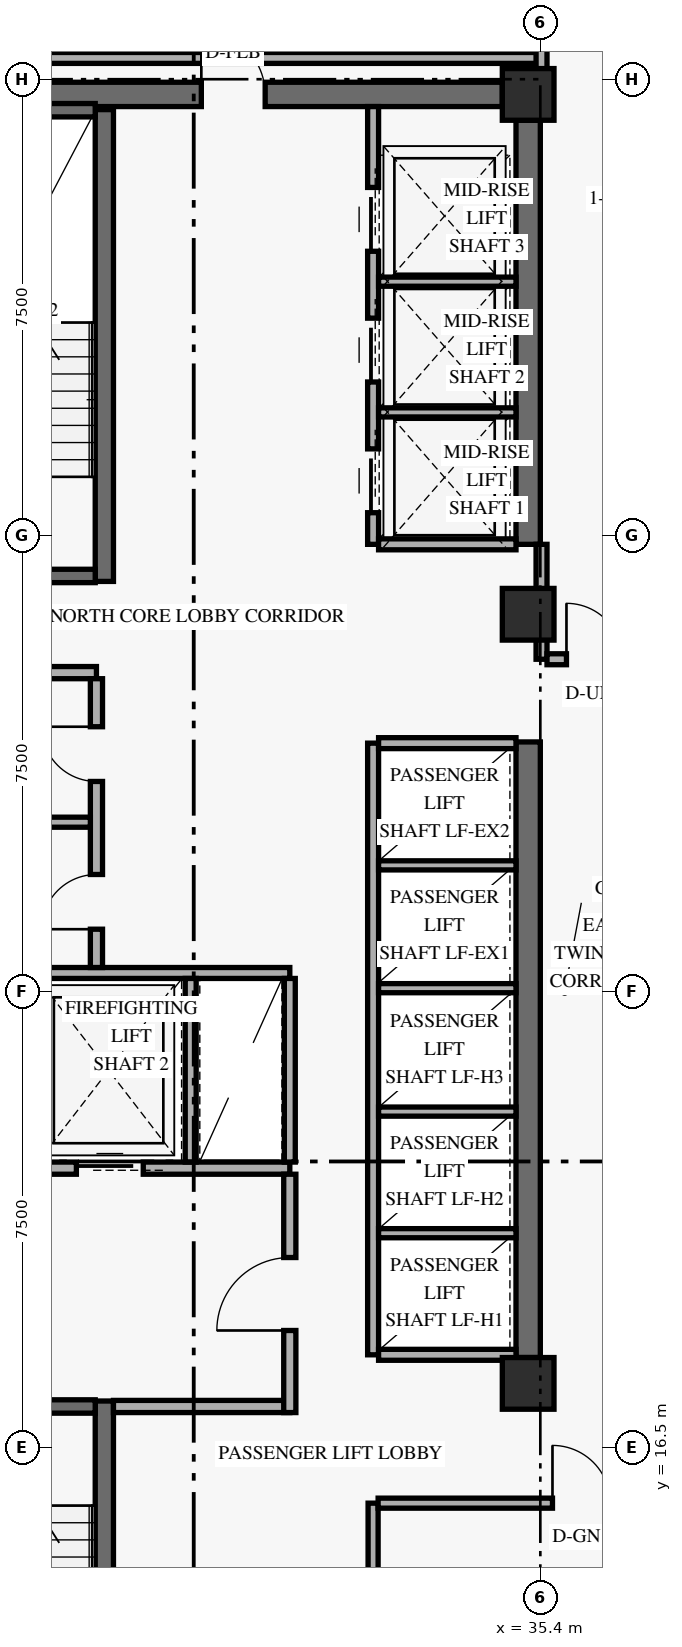
"""IFC4 building model, lengths in metres.
Left out: names, types, materials, properties, quantities, classifications, styles, units other than length and angle.
Written with IfcOpenShell. Run it as: python <this file> out.ifc"""

import sys

from ifc_helpers import new_model, si_unit, direction, frame, frame_2d, origin, origin_2d, place, context, subcontext, project, spatial, rectangle, extrude, element, fill, save


model = new_model("IFC4")
c1 = context("Model", 3, precision=1e-05, world=origin(), true_north=direction((0.0, 1.0)))
c2 = subcontext(c1, "Body", "Model", "MODEL_VIEW")
j1 = project(units=[si_unit("LENGTHUNIT", "METRE"), si_unit("PLANEANGLEUNIT", "RADIAN")], contexts=[c1])
p1 = place(None, origin())
s1 = spatial("IfcSite", under=j1, at=p1, CompositionType="ELEMENT")
p2 = place(p1, origin())
s2 = spatial("IfcBuilding", under=s1, at=p2, CompositionType="ELEMENT")
p3 = place(p2, frame((0.0, 0.0, 109.8)))
s3 = spatial("IfcBuildingStorey", under=s2, at=p3, CompositionType="ELEMENT", Elevation=109.8)
p4 = place(p3, frame((35.2, 17.975, 0.0), z_axis=(0.0, 0.0, 1.0), x_axis=(0.0, 1.0, 0.0)))
e1 = element("IfcWall", 1, at=p4, inside=s3, PredefinedType="SHEAR", context=c2, shape_type="SweptSolid", body=[
    extrude(rectangle(XDim=10.125, YDim=0.4, at=frame_2d((5.062, 0.0))), origin(), (0.0, 0.0, 1.0), 2.749),
])
p5 = place(p3, frame((35.2, 31.35, 0.0), z_axis=(0.0, 0.0, 1.0), x_axis=(0.0, 1.0, 0.0)))
e2 = element("IfcWall", 2, at=p5, inside=s3, PredefinedType="SHEAR", context=c2, shape_type="SweptSolid", body=[
    extrude(rectangle(XDim=6.975, YDim=0.4, at=frame_2d((3.487, 0.0))), origin(), (0.0, 0.0, 1.0), 2.749),
])
p6 = place(p3, frame((24.625, 38.75, 0.0), z_axis=(0.0, 0.0, 1.0), x_axis=(1.0, 0.0, 0.0)))
e3 = element("IfcWall", 3, at=p6, inside=s3, PredefinedType="SHEAR", context=c2, shape_type="SweptSolid", body=[
    extrude(rectangle(XDim=10.15, YDim=0.4, at=frame_2d((5.075, 0.0))), origin(), (0.0, 0.0, 1.0), 3.36),
])
p7 = place(p6, frame((5.2, 0.0, 0.0)))
e4 = element("IfcOpeningElement", 4, at=p7, cuts=e3, PredefinedType="OPENING", context=c2, shape_type="SweptSolid", body=[
    extrude(rectangle(XDim=1.05, YDim=2.15, at=frame_2d((0.525, 1.075))), frame((0.0, 0.21, 0.0), z_axis=(0.0, -1.0, 0.0), x_axis=(1.0, 0.0, 0.0)), (0.0, 0.0, 1.0), 0.42),
])
p8 = place(p3, frame((28.23, 9.5, 0.0), z_axis=(0.0, 0.0, 1.0), x_axis=(0.0, 1.0, 0.0)))
e5 = element("IfcWall", 5, at=p8, inside=s3, PredefinedType="SHEAR", context=c2, shape_type="SweptSolid", body=[
    extrude(rectangle(XDim=7.76, YDim=0.3, at=frame_2d((3.88, 0.0))), origin(), (0.0, 0.0, 1.0), 3.36),
])
p9 = place(p3, frame((24.92, 17.17, 0.0), z_axis=(0.0, 0.0, 1.0), x_axis=(1.0, 0.0, 0.0)))
e6 = element("IfcWall", 6, at=p9, inside=s3, PredefinedType="SHEAR", context=c2, shape_type="SweptSolid", body=[
    extrude(rectangle(XDim=3.16, YDim=0.22, at=frame_2d((1.58, 0.0))), origin(), (0.0, 0.0, 1.0), 3.36),
])
p10 = place(p9, frame((0.78, 0.0, 0.0)))
e7 = element("IfcOpeningElement", 7, at=p10, cuts=e6, PredefinedType="OPENING", context=c2, shape_type="SweptSolid", body=[
    extrude(rectangle(XDim=1.05, YDim=2.15, at=frame_2d((0.525, 1.075))), frame((0.0, 0.12, 0.0), z_axis=(0.0, -1.0, 0.0), x_axis=(1.0, 0.0, 0.0)), (0.0, 0.0, 1.0), 0.24),
])
p11 = place(p3, frame((28.23, 30.74, 0.0), z_axis=(0.0, 0.0, 1.0), x_axis=(0.0, 1.0, 0.0)))
e8 = element("IfcWall", 8, at=p11, inside=s3, PredefinedType="SHEAR", context=c2, shape_type="SweptSolid", body=[
    extrude(rectangle(XDim=7.76, YDim=0.3, at=frame_2d((3.88, 0.0))), origin(), (0.0, 0.0, 1.0), 3.36),
])
p12 = place(p3, frame((24.92, 30.83, 0.0), z_axis=(0.0, 0.0, 1.0), x_axis=(1.0, 0.0, 0.0)))
e9 = element("IfcWall", 9, at=p12, inside=s3, PredefinedType="SHEAR", context=c2, shape_type="SweptSolid", body=[
    extrude(rectangle(XDim=3.16, YDim=0.22, at=frame_2d((1.58, 0.0))), origin(), (0.0, 0.0, 1.0), 3.36),
])
p13 = place(p12, frame((0.78, 0.0, 0.0)))
e10 = element("IfcOpeningElement", 10, at=p13, cuts=e9, PredefinedType="OPENING", context=c2, shape_type="SweptSolid", body=[
    extrude(rectangle(XDim=1.05, YDim=2.15, at=frame_2d((0.525, 1.075))), frame((0.0, 0.12, 0.0), z_axis=(0.0, -1.0, 0.0), x_axis=(1.0, 0.0, 0.0)), (0.0, 0.0, 1.0), 0.24),
])
p14 = place(p3, frame((24.92, 38.49, 0.0), z_axis=(0.0, 0.0, 1.0), x_axis=(1.0, 0.0, 0.0)))
e11 = element("IfcWall", 11, at=p14, inside=s3, PredefinedType="SHEAR", context=c2, shape_type="SweptSolid", body=[
    extrude(rectangle(XDim=3.16, YDim=0.22, at=frame_2d((1.58, 0.0))), origin(), (0.0, 0.0, 1.0), 3.36),
])
for number, where, z_axis, x_axis in (
    (12, (35.2, 17.55, 0.0), (0.0, 0.0, 1.0), (1.0, 0.0, 0.0)),
    (13, (35.2, 30.2, 0.0), (0.0, 0.0, 1.0), (1.0, 0.0, 0.0)),
    (14, (35.2, 38.75, 0.0), (0.0, 0.0, 1.0), (1.0, 0.0, 0.0)),
):
    element("IfcColumn", number, at=place(p3, frame(where, z_axis=z_axis, x_axis=x_axis)), inside=s3, PredefinedType="COLUMN", context=c2, shape_type="SweptSolid", body=[
        extrude(rectangle(XDim=0.85, YDim=0.85, at=origin_2d()), origin(), (0.0, 0.0, 1.0), 3.6),
    ])
p15 = place(p3, frame((24.45, 21.09, 0.0), z_axis=(0.0, 0.0, 1.0), x_axis=(1.0, 0.0, 0.0)))
e15 = element("IfcWall", 15, at=p15, inside=s3, PredefinedType="STANDARD", context=c2, shape_type="SweptSolid", body=[
    extrude(rectangle(XDim=6.83, YDim=0.2, at=frame_2d((3.415, 0.0))), origin(), (0.0, 0.0, 1.0), 3.36),
])
p16 = place(p15, frame((0.72, 0.0, 0.0)))
e16 = element("IfcOpeningElement", 16, at=p16, cuts=e15, PredefinedType="OPENING", context=c2, shape_type="SweptSolid", body=[
    extrude(rectangle(XDim=1.1, YDim=2.2, at=frame_2d((0.55, 1.1))), frame((0.0, 0.11, 0.0), z_axis=(0.0, -1.0, 0.0), x_axis=(1.0, 0.0, 0.0)), (0.0, 0.0, 1.0), 0.22),
])
p17 = place(p15, frame((3.32, 0.0, 0.0)))
e17 = element("IfcOpeningElement", 17, at=p17, cuts=e15, PredefinedType="OPENING", context=c2, shape_type="SweptSolid", body=[
    extrude(rectangle(XDim=1.1, YDim=2.2, at=frame_2d((0.55, 1.1))), frame((0.0, 0.11, 0.0), z_axis=(0.0, -1.0, 0.0), x_axis=(1.0, 0.0, 0.0)), (0.0, 0.0, 1.0), 0.22),
])
p18 = place(p3, frame((28.38, 17.17, 0.0), z_axis=(0.0, 0.0, 1.0), x_axis=(1.0, 0.0, 0.0)))
e18 = element("IfcWall", 18, at=p18, inside=s3, PredefinedType="STANDARD", context=c2, shape_type="SweptSolid", body=[
    extrude(rectangle(XDim=2.9, YDim=0.2, at=frame_2d((1.45, 0.0))), origin(), (0.0, 0.0, 1.0), 3.36),
])
p19 = place(p3, frame((31.28, 17.07, 0.0), z_axis=(0.0, 0.0, 1.0), x_axis=(0.0, 1.0, 0.0)))
e19 = element("IfcWall", 19, at=p19, inside=s3, PredefinedType="STANDARD", context=c2, shape_type="SweptSolid", body=[
    extrude(rectangle(XDim=3.92, YDim=0.2, at=frame_2d((1.96, 0.0))), origin(), (0.0, 0.0, 1.0), 2.731),
])
p20 = place(p19, frame((1.35, 0.0, 0.0)))
e20 = element("IfcOpeningElement", 20, at=p20, cuts=e19, PredefinedType="OPENING", context=c2, shape_type="SweptSolid", body=[
    extrude(rectangle(XDim=1.2, YDim=2.15, at=frame_2d((0.6, 1.075))), frame((0.0, 0.11, 0.0), z_axis=(0.0, -1.0, 0.0), x_axis=(1.0, 0.0, 0.0)), (0.0, 0.0, 1.0), 0.22),
])
p21 = place(p3, frame((24.45, 24.3, 0.0), z_axis=(0.0, 0.0, 1.0), x_axis=(1.0, 0.0, 0.0)))
e21 = element("IfcWall", 21, at=p21, inside=s3, PredefinedType="STANDARD", context=c2, shape_type="SweptSolid", body=[
    extrude(rectangle(XDim=6.83, YDim=0.18, at=frame_2d((3.415, 0.0))), origin(), (0.0, 0.0, 1.0), 3.36),
])
for number, where, z_axis, x_axis in (
    (22, (29.65, 21.19, 0.0), (0.0, 0.0, 1.0), (0.0, 1.0, 0.0)),
    (23, (31.28, 21.19, 0.0), (0.0, 0.0, 1.0), (0.0, 1.0, 0.0)),
):
    element("IfcWall", number, at=place(p3, frame(where, z_axis=z_axis, x_axis=x_axis)), inside=s3, PredefinedType="STANDARD", context=c2, shape_type="SweptSolid", body=[
        extrude(rectangle(XDim=3.02, YDim=0.18, at=frame_2d((1.51, 0.0))), origin(), (0.0, 0.0, 1.0), 3.36),
    ])
p22 = place(p3, frame((24.45, 29.24, 0.0), z_axis=(0.0, 0.0, 1.0), x_axis=(1.0, 0.0, 0.0)))
e24 = element("IfcWall", 24, at=p22, inside=s3, PredefinedType="STANDARD", context=c2, shape_type="SweptSolid", body=[
    extrude(rectangle(XDim=3.65, YDim=0.2, at=frame_2d((1.825, 0.0))), origin(), (0.0, 0.0, 1.0), 3.36),
])
p23 = place(p3, frame((28.1, 24.39, 0.0), z_axis=(0.0, 0.0, 1.0), x_axis=(0.0, 1.0, 0.0)))
e25 = element("IfcWall", 25, at=p23, inside=s3, PredefinedType="STANDARD", context=c2, shape_type="SweptSolid", body=[
    extrude(rectangle(XDim=4.75, YDim=0.2, at=frame_2d((2.375, 0.0))), origin(), (0.0, 0.0, 1.0), 3.36),
])
p24 = place(p23, frame((0.63, 0.0, 0.0)))
e26 = element("IfcOpeningElement", 26, at=p24, cuts=e25, PredefinedType="OPENING", context=c2, shape_type="SweptSolid", body=[
    extrude(rectangle(XDim=0.9, YDim=2.1, at=frame_2d((0.45, 1.05))), frame((0.0, 0.11, 0.0), z_axis=(0.0, -1.0, 0.0), x_axis=(1.0, 0.0, 0.0)), (0.0, 0.0, 1.0), 0.22),
])
p25 = place(p23, frame((3.06, 0.0, 0.0)))
e27 = element("IfcOpeningElement", 27, at=p25, cuts=e25, PredefinedType="OPENING", context=c2, shape_type="SweptSolid", body=[
    extrude(rectangle(XDim=0.9, YDim=2.1, at=frame_2d((0.45, 1.05))), frame((0.0, 0.11, 0.0), z_axis=(0.0, -1.0, 0.0), x_axis=(1.0, 0.0, 0.0)), (0.0, 0.0, 1.0), 0.22),
])
p26 = place(p3, frame((24.45, 26.78, 0.0), z_axis=(0.0, 0.0, 1.0), x_axis=(1.0, 0.0, 0.0)))
e28 = element("IfcWall", 28, at=p26, inside=s3, PredefinedType="PARTITIONING", context=c2, shape_type="SweptSolid", body=[
    extrude(rectangle(XDim=3.55, YDim=0.165, at=frame_2d((1.775, 0.0))), origin(), (0.0, 0.0, 1.0), 3.36),
])
p27 = place(p3, frame((32.65, 18.02, 0.0), z_axis=(0.0, 0.0, 1.0), x_axis=(0.0, 1.0, 0.0)))
e29 = element("IfcWall", 29, at=p27, inside=s3, PredefinedType="STANDARD", context=c2, shape_type="SweptSolid", body=[
    extrude(rectangle(XDim=10.06, YDim=0.18, at=frame_2d((5.03, 0.0))), origin(), (0.0, 0.0, 1.0), 3.36),
])
for number, where, z_axis, x_axis in (
    (30, (32.74, 18.02, 0.0), (0.0, 0.0, 1.0), (1.0, 0.0, 0.0)),
    (31, (32.74, 28.08, 0.0), (0.0, 0.0, 1.0), (1.0, 0.0, 0.0)),
):
    element("IfcWall", number, at=place(p3, frame(where, z_axis=z_axis, x_axis=x_axis)), inside=s3, PredefinedType="STANDARD", context=c2, shape_type="SweptSolid", body=[
        extrude(rectangle(XDim=2.26, YDim=0.18, at=frame_2d((1.13, 0.0))), origin(), (0.0, 0.0, 1.0), 3.36),
    ])
for number, where, z_axis, x_axis in (
    (32, (32.74, 20.02, 0.0), (0.0, 0.0, 1.0), (1.0, 0.0, 0.0)),
    (33, (32.74, 22.02, 0.0), (0.0, 0.0, 1.0), (1.0, 0.0, 0.0)),
    (34, (32.74, 24.05, 0.0), (0.0, 0.0, 1.0), (1.0, 0.0, 0.0)),
    (35, (32.74, 26.07, 0.0), (0.0, 0.0, 1.0), (1.0, 0.0, 0.0)),
):
    element("IfcWall", number, at=place(p3, frame(where, z_axis=z_axis, x_axis=x_axis)), inside=s3, PredefinedType="STANDARD", context=c2, shape_type="SweptSolid", body=[
        extrude(rectangle(XDim=2.26, YDim=0.15, at=frame_2d((1.13, 0.0))), origin(), (0.0, 0.0, 1.0), 3.36),
    ])
p28 = place(p3, frame((32.65, 31.35, 0.0), z_axis=(0.0, 0.0, 1.0), x_axis=(0.0, 1.0, 0.0)))
e36 = element("IfcWall", 36, at=p28, inside=s3, PredefinedType="STANDARD", context=c2, shape_type="SweptSolid", body=[
    extrude(rectangle(XDim=7.2, YDim=0.18, at=frame_2d((3.6, 0.0))), origin(), (0.0, 0.0, 1.0), 3.36),
])
p29 = place(p28, frame((0.52, 0.0, 0.0)))
e37 = element("IfcOpeningElement", 37, at=p29, cuts=e36, PredefinedType="OPENING", context=c2, shape_type="SweptSolid", body=[
    extrude(rectangle(XDim=1.05, YDim=2.2, at=frame_2d((0.525, 1.1))), frame((0.0, 0.1, 0.0), z_axis=(0.0, -1.0, 0.0), x_axis=(1.0, 0.0, 0.0)), (0.0, 0.0, 1.0), 0.2),
])
p30 = place(p28, frame((2.67, 0.0, 0.0)))
e38 = element("IfcOpeningElement", 38, at=p30, cuts=e36, PredefinedType="OPENING", context=c2, shape_type="SweptSolid", body=[
    extrude(rectangle(XDim=1.05, YDim=2.2, at=frame_2d((0.525, 1.1))), frame((0.0, 0.1, 0.0), z_axis=(0.0, -1.0, 0.0), x_axis=(1.0, 0.0, 0.0)), (0.0, 0.0, 1.0), 0.2),
])
p31 = place(p28, frame((4.82, 0.0, 0.0)))
e39 = element("IfcOpeningElement", 39, at=p31, cuts=e36, PredefinedType="OPENING", context=c2, shape_type="SweptSolid", body=[
    extrude(rectangle(XDim=1.05, YDim=2.2, at=frame_2d((0.525, 1.1))), frame((0.0, 0.1, 0.0), z_axis=(0.0, -1.0, 0.0), x_axis=(1.0, 0.0, 0.0)), (0.0, 0.0, 1.0), 0.2),
])
p32 = place(p3, frame((32.74, 31.35, 0.0), z_axis=(0.0, 0.0, 1.0), x_axis=(1.0, 0.0, 0.0)))
e40 = element("IfcWall", 40, at=p32, inside=s3, PredefinedType="STANDARD", context=c2, shape_type="SweptSolid", body=[
    extrude(rectangle(XDim=2.26, YDim=0.18, at=frame_2d((1.13, 0.0))), origin(), (0.0, 0.0, 1.0), 3.36),
])
for number, where, z_axis, x_axis in (
    (41, (32.74, 33.52, 0.0), (0.0, 0.0, 1.0), (1.0, 0.0, 0.0)),
    (42, (32.74, 35.67, 0.0), (0.0, 0.0, 1.0), (1.0, 0.0, 0.0)),
):
    element("IfcWall", number, at=place(p3, frame(where, z_axis=z_axis, x_axis=x_axis)), inside=s3, PredefinedType="STANDARD", context=c2, shape_type="SweptSolid", body=[
        extrude(rectangle(XDim=2.26, YDim=0.15, at=frame_2d((1.13, 0.0))), origin(), (0.0, 0.0, 1.0), 3.36),
    ])
p33 = place(p3, frame((32.65, 9.5, 0.0), z_axis=(0.0, 0.0, 1.0), x_axis=(0.0, 1.0, 0.0)))
e43 = element("IfcWall", 43, at=p33, inside=s3, PredefinedType="PARTITIONING", context=c2, shape_type="SweptSolid", body=[
    extrude(rectangle(XDim=6.08, YDim=0.165, at=frame_2d((3.04, 0.0))), origin(), (0.0, 0.0, 1.0), 3.36),
])
p34 = place(p3, frame((32.732, 15.58, 0.0), z_axis=(0.0, 0.0, 1.0), x_axis=(1.0, 0.0, 0.0)))
e44 = element("IfcWall", 44, at=p34, inside=s3, PredefinedType="PARTITIONING", context=c2, shape_type="SweptSolid", body=[
    extrude(rectangle(XDim=5.218, YDim=0.165, at=frame_2d((2.609, 0.0))), origin(), (0.0, 0.0, 1.0), 2.731),
])
p35 = place(p34, frame((2.867, 0.0, 0.0)))
e45 = element("IfcOpeningElement", 45, at=p35, cuts=e44, PredefinedType="OPENING", context=c2, shape_type="SweptSolid", body=[
    extrude(rectangle(XDim=0.95, YDim=2.15, at=frame_2d((0.475, 1.075))), frame((0.0, 0.093, 0.0), z_axis=(0.0, -1.0, 0.0), x_axis=(1.0, 0.0, 0.0)), (0.0, 0.0, 1.0), 0.185),
])
p36 = place(p3, frame((35.42, 29.46, 0.0), z_axis=(0.0, 0.0, 1.0), x_axis=(0.0, 1.0, 0.0)))
e46 = element("IfcWall", 46, at=p36, inside=s3, PredefinedType="STANDARD", context=c2, shape_type="SweptSolid", body=[
    extrude(rectangle(XDim=1.89, YDim=0.18, at=frame_2d((0.945, 0.0))), origin(), (0.0, 0.0, 1.0), 2.731),
])
p37 = place(p3, frame((35.51, 29.46, 0.0), z_axis=(0.0, 0.0, 1.0), x_axis=(1.0, 0.0, 0.0)))
e47 = element("IfcWall", 47, at=p37, inside=s3, PredefinedType="STANDARD", context=c2, shape_type="SweptSolid", body=[
    extrude(rectangle(XDim=10.09, YDim=0.18, at=frame_2d((5.045, 0.0))), origin(), (0.0, 0.0, 1.0), 2.731),
])
p38 = place(p37, frame((0.32, 0.0, 0.0)))
e48 = element("IfcOpeningElement", 48, at=p38, cuts=e47, PredefinedType="OPENING", context=c2, shape_type="SweptSolid", body=[
    extrude(rectangle(XDim=0.92, YDim=2.15, at=frame_2d((0.46, 1.075))), frame((0.0, 0.1, 0.0), z_axis=(0.0, -1.0, 0.0), x_axis=(1.0, 0.0, 0.0)), (0.0, 0.0, 1.0), 0.2),
])
p39 = place(p3, frame((23.85, 39.35, 0.0), z_axis=(0.0, 0.0, 1.0), x_axis=(1.0, 0.0, 0.0)))
e49 = element("IfcWall", 49, at=p39, inside=s3, PredefinedType="STANDARD", context=c2, shape_type="SweptSolid", body=[
    extrude(rectangle(XDim=11.57, YDim=0.18, at=frame_2d((5.785, 0.0))), origin(), (0.0, 0.0, 1.0), 2.731),
])
p40 = place(p3, frame((35.42, 38.75, 0.0), z_axis=(0.0, 0.0, 1.0), x_axis=(0.0, 1.0, 0.0)))
e50 = element("IfcWall", 50, at=p40, inside=s3, PredefinedType="PARTITIONING", context=c2, shape_type="SweptSolid", body=[
    extrude(rectangle(XDim=6.27, YDim=0.18, at=frame_2d((3.135, 0.0))), origin(), (0.0, 0.0, 1.0), 2.731),
])
p41 = place(p17, origin())
e51 = element("IfcDoor", 51, at=p41, inside=s3, OperationType="SLIDING_TO_LEFT", PredefinedType="DOOR", context=c2, shape_type="SweptSolid", body=[
    extrude(rectangle(XDim=1.1, YDim=2.2, at=frame_2d((0.55, 1.1))), frame((0.0, 0.025, 0.0), z_axis=(0.0, -1.0, 0.0), x_axis=(1.0, 0.0, 0.0)), (0.0, 0.0, 1.0), 0.05),
])
fill(e17, e51)
p42 = place(p20, origin())
e52 = element("IfcDoor", 52, at=p42, inside=s3, OperationType="SINGLE_SWING_LEFT", PredefinedType="DOOR", context=c2, shape_type="SweptSolid", body=[
    extrude(rectangle(XDim=1.2, YDim=2.15, at=frame_2d((0.6, 1.075))), frame((0.0, 0.025, 0.0), z_axis=(0.0, -1.0, 0.0), x_axis=(1.0, 0.0, 0.0)), (0.0, 0.0, 1.0), 0.05),
])
fill(e20, e52)
p43 = place(p24, origin())
e53 = element("IfcDoor", 53, at=p43, inside=s3, OperationType="SINGLE_SWING_LEFT", PredefinedType="DOOR", context=c2, shape_type="SweptSolid", body=[
    extrude(rectangle(XDim=0.9, YDim=2.1, at=frame_2d((0.45, 1.05))), frame((0.0, 0.025, 0.0), z_axis=(0.0, -1.0, 0.0), x_axis=(1.0, 0.0, 0.0)), (0.0, 0.0, 1.0), 0.05),
])
fill(e26, e53)
p44 = place(p25, origin())
e54 = element("IfcDoor", 54, at=p44, inside=s3, OperationType="SINGLE_SWING_RIGHT", PredefinedType="DOOR", context=c2, shape_type="SweptSolid", body=[
    extrude(rectangle(XDim=0.9, YDim=2.1, at=frame_2d((0.45, 1.05))), frame((0.0, 0.025, 0.0), z_axis=(0.0, -1.0, 0.0), x_axis=(1.0, 0.0, 0.0)), (0.0, 0.0, 1.0), 0.05),
])
fill(e27, e54)
p45 = place(p29, origin())
e55 = element("IfcDoor", 55, at=p45, inside=s3, OperationType="SLIDING_TO_LEFT", PredefinedType="DOOR", context=c2, shape_type="SweptSolid", body=[
    extrude(rectangle(XDim=1.05, YDim=2.2, at=frame_2d((0.525, 1.1))), frame((0.0, 0.025, 0.0), z_axis=(0.0, -1.0, 0.0), x_axis=(1.0, 0.0, 0.0)), (0.0, 0.0, 1.0), 0.05),
])
fill(e37, e55)
p46 = place(p30, origin())
e56 = element("IfcDoor", 56, at=p46, inside=s3, OperationType="SLIDING_TO_LEFT", PredefinedType="DOOR", context=c2, shape_type="SweptSolid", body=[
    extrude(rectangle(XDim=1.05, YDim=2.2, at=frame_2d((0.525, 1.1))), frame((0.0, 0.025, 0.0), z_axis=(0.0, -1.0, 0.0), x_axis=(1.0, 0.0, 0.0)), (0.0, 0.0, 1.0), 0.05),
])
fill(e38, e56)
p47 = place(p31, origin())
e57 = element("IfcDoor", 57, at=p47, inside=s3, OperationType="SLIDING_TO_LEFT", PredefinedType="DOOR", context=c2, shape_type="SweptSolid", body=[
    extrude(rectangle(XDim=1.05, YDim=2.2, at=frame_2d((0.525, 1.1))), frame((0.0, 0.025, 0.0), z_axis=(0.0, -1.0, 0.0), x_axis=(1.0, 0.0, 0.0)), (0.0, 0.0, 1.0), 0.05),
])
fill(e39, e57)
p48 = place(p35, origin())
e58 = element("IfcDoor", 58, at=p48, inside=s3, OperationType="SINGLE_SWING_LEFT", PredefinedType="DOOR", context=c2, shape_type="SweptSolid", body=[
    extrude(rectangle(XDim=0.95, YDim=2.15, at=frame_2d((0.475, 1.075))), frame((0.0, 0.025, 0.0), z_axis=(0.0, -1.0, 0.0), x_axis=(1.0, 0.0, 0.0)), (0.0, 0.0, 1.0), 0.05),
])
fill(e45, e58)
p49 = place(p7, frame((1.05, 0.0, 0.0), z_axis=(0.0, 0.0, 1.0), x_axis=(-1.0, 0.0, 0.0)))
e59 = element("IfcDoor", 59, at=p49, inside=s3, OperationType="SINGLE_SWING_RIGHT", PredefinedType="DOOR", context=c2, shape_type="SweptSolid", body=[
    extrude(rectangle(XDim=1.05, YDim=2.15, at=frame_2d((0.525, 1.075))), frame((0.0, 0.025, 0.0), z_axis=(0.0, -1.0, 0.0), x_axis=(1.0, 0.0, 0.0)), (0.0, 0.0, 1.0), 0.05),
])
fill(e4, e59)
p50 = place(p38, origin())
e60 = element("IfcDoor", 60, at=p50, inside=s3, OperationType="SINGLE_SWING_LEFT", PredefinedType="DOOR", context=c2, shape_type="SweptSolid", body=[
    extrude(rectangle(XDim=0.92, YDim=2.15, at=frame_2d((0.46, 1.075))), frame((0.0, 0.025, 0.0), z_axis=(0.0, -1.0, 0.0), x_axis=(1.0, 0.0, 0.0)), (0.0, 0.0, 1.0), 0.05),
])
fill(e48, e60)
save(model, sys.argv[1])
